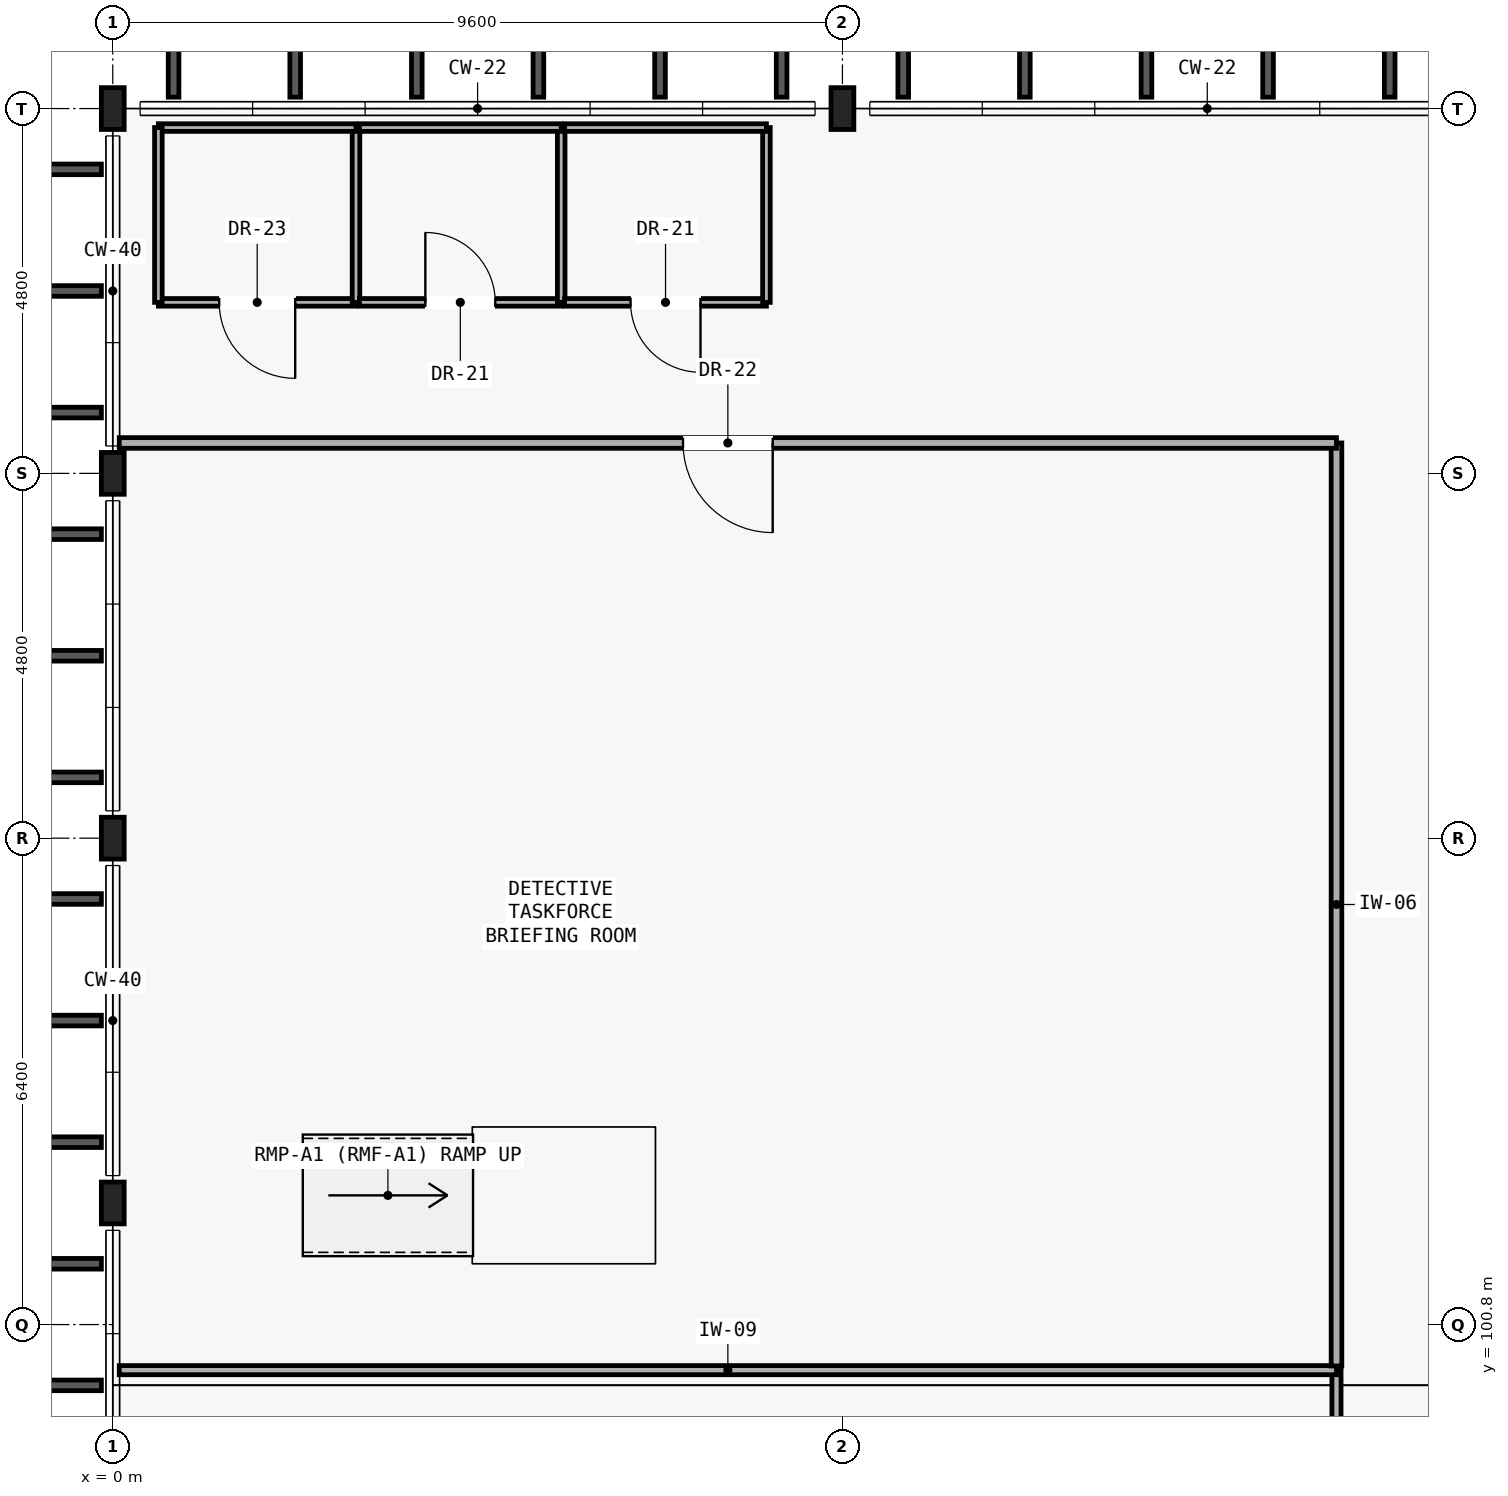
"""IFC4 building model, lengths in metres.
Left out: names, types, materials, properties, quantities, classifications, styles, units other than length and angle.
Written with IfcOpenShell. Run it as: python <this file> out.ifc"""

import sys

from ifc_helpers import new_model, si_unit, direction, frame, frame_2d, origin, origin_2d, place, context, subcontext, project, spatial, rectangle, i_section, extrude, element, fill, save


model = new_model("IFC4")
c1 = context("Model", 3, precision=1e-05, world=origin(), true_north=direction((0.0, 1.0)))
c2 = subcontext(c1, "Body", "Model", "MODEL_VIEW")
j1 = project(units=[si_unit("LENGTHUNIT", "METRE"), si_unit("PLANEANGLEUNIT", "RADIAN")], contexts=[c1])
p1 = place(None, origin())
s1 = spatial("IfcSite", under=j1, at=p1, CompositionType="ELEMENT")
p2 = place(p1, origin())
s2 = spatial("IfcBuilding", under=s1, at=p2, CompositionType="ELEMENT")
p3 = place(p2, frame((0.0, 0.0, 9.45)))
s3 = spatial("IfcBuildingStorey", under=s2, at=p3, CompositionType="ELEMENT", Elevation=9.45)
for number, where, z_axis, x_axis in (
    (1, (0.0, 102.4, 0.0), (0.0, 0.0, 1.0), (1.0, 0.0, 0.0)),
    (2, (0.0, 107.2, 0.0), (0.0, 0.0, 1.0), (1.0, 0.0, 0.0)),
    (3, (0.0, 112.0, 0.0), (0.0, 0.0, 1.0), (1.0, 0.0, 0.0)),
    (4, (0.0, 116.8, 0.0), (0.0, 0.0, 1.0), (1.0, 0.0, 0.0)),
    (5, (9.6, 116.8, 0.0), (0.0, 0.0, 1.0), (1.0, 0.0, 0.0)),
):
    element("IfcColumn", number, at=place(p3, frame(where, z_axis=z_axis, x_axis=x_axis)), inside=s3, PredefinedType="COLUMN", context=c2, shape_type="SweptSolid", body=[
        extrude(i_section(OverallWidth=0.3, OverallDepth=0.55, WebThickness=0.015, FlangeThickness=0.029, FilletRadius=0.027, at=origin_2d()), origin(), (0.0, 0.0, 1.0), 4.2),
    ])
p4 = place(p3, frame((16.1, 83.4, 0.0), z_axis=(0.0, 0.0, 1.0), x_axis=(0.0, 1.0, 0.0)))
e6 = element("IfcWall", 6, at=p4, inside=s3, PredefinedType="PARTITIONING", context=c2, shape_type="SweptSolid", body=[
    extrude(rectangle(XDim=16.8, YDim=0.12, at=frame_2d((8.4, 0.0))), origin(), (0.0, 0.0, 1.0), 3.97),
])
p5 = place(p4, frame((7.91, 0.0, 0.0)))
e7 = element("IfcOpeningElement", 7, at=p5, cuts=e6, PredefinedType="OPENING", context=c2, shape_type="SweptSolid", body=[
    extrude(rectangle(XDim=0.98, YDim=2.1, at=frame_2d((0.49, 1.05))), frame((0.0, 0.07, 0.0), z_axis=(0.0, -1.0, 0.0), x_axis=(1.0, 0.0, 0.0)), (0.0, 0.0, 1.0), 0.14),
])
p6 = place(p3, frame((16.1, 100.2, 0.0), z_axis=(0.0, 0.0, 1.0), x_axis=(-1.0, 0.0, 0.0)))
e8 = element("IfcWall", 8, at=p6, inside=s3, PredefinedType="PARTITIONING", context=c2, shape_type="SweptSolid", body=[
    extrude(rectangle(XDim=16.015, YDim=0.12, at=frame_2d((8.008, 0.0))), origin(), (0.0, 0.0, 1.0), 3.45),
])
p7 = place(p3, frame((16.1, 100.255, 0.0), z_axis=(0.0, 0.0, 1.0), x_axis=(0.0, 1.0, 0.0)))
e9 = element("IfcWall", 9, at=p7, inside=s3, PredefinedType="PARTITIONING", context=c2, shape_type="SweptSolid", body=[
    extrude(rectangle(XDim=12.145, YDim=0.14, at=frame_2d((6.073, 0.0))), origin(), (0.0, 0.0, 1.0), 3.97),
])
p8 = place(p3, frame((16.1, 112.4, 0.0), z_axis=(0.0, 0.0, 1.0), x_axis=(-1.0, 0.0, 0.0)))
e10 = element("IfcWall", 10, at=p8, inside=s3, PredefinedType="PARTITIONING", context=c2, shape_type="SweptSolid", body=[
    extrude(rectangle(XDim=16.015, YDim=0.14, at=frame_2d((8.008, 0.0))), origin(), (0.0, 0.0, 1.0), 3.97),
])
p9 = place(p8, frame((7.417, 0.0, 0.0)))
e11 = element("IfcOpeningElement", 11, at=p9, cuts=e10, PredefinedType="OPENING", context=c2, shape_type="SweptSolid", body=[
    extrude(rectangle(XDim=1.18, YDim=2.1, at=frame_2d((0.59, 1.05))), frame((0.0, 0.08, 0.0), z_axis=(0.0, -1.0, 0.0), x_axis=(1.0, 0.0, 0.0)), (0.0, 0.0, 1.0), 0.16),
])
p10 = place(p3, frame((0.6, 114.25, 0.0), z_axis=(0.0, 0.0, 1.0), x_axis=(1.0, 0.0, 0.0)))
e12 = element("IfcWall", 12, at=p10, inside=s3, PredefinedType="PARTITIONING", context=c2, shape_type="SweptSolid", body=[
    extrude(rectangle(XDim=2.6, YDim=0.1, at=frame_2d((1.3, 0.0))), origin(), (0.0, 0.0, 1.0), 3.45),
])
p11 = place(p10, frame((0.8, 0.0, 0.0)))
e13 = element("IfcOpeningElement", 13, at=p11, cuts=e12, PredefinedType="OPENING", context=c2, shape_type="SweptSolid", body=[
    extrude(rectangle(XDim=1.0, YDim=2.08, at=frame_2d((0.5, 1.04))), frame((0.0, 0.06, 0.0), z_axis=(0.0, -1.0, 0.0), x_axis=(1.0, 0.0, 0.0)), (0.0, 0.0, 1.0), 0.12),
])
p12 = place(p3, frame((3.2, 114.25, 0.0), z_axis=(0.0, 0.0, 1.0), x_axis=(0.0, 1.0, 0.0)))
e14 = element("IfcWall", 14, at=p12, inside=s3, PredefinedType="PARTITIONING", context=c2, shape_type="SweptSolid", body=[
    extrude(rectangle(XDim=2.3, YDim=0.1, at=frame_2d((1.15, 0.0))), origin(), (0.0, 0.0, 1.0), 3.97),
])
p13 = place(p3, frame((3.2, 116.55, 0.0), z_axis=(0.0, 0.0, 1.0), x_axis=(-1.0, 0.0, 0.0)))
e15 = element("IfcWall", 15, at=p13, inside=s3, PredefinedType="PARTITIONING", context=c2, shape_type="SweptSolid", body=[
    extrude(rectangle(XDim=2.6, YDim=0.1, at=frame_2d((1.3, 0.0))), origin(), (0.0, 0.0, 1.0), 3.15),
])
p14 = place(p3, frame((0.6, 116.55, 0.0), z_axis=(0.0, 0.0, 1.0), x_axis=(0.0, -1.0, 0.0)))
e16 = element("IfcWall", 16, at=p14, inside=s3, PredefinedType="PARTITIONING", context=c2, shape_type="SweptSolid", body=[
    extrude(rectangle(XDim=2.3, YDim=0.1, at=frame_2d((1.15, 0.0))), origin(), (0.0, 0.0, 1.0), 3.97),
])
p15 = place(p3, frame((3.245, 114.25, 0.0), z_axis=(0.0, 0.0, 1.0), x_axis=(1.0, 0.0, 0.0)))
e17 = element("IfcWall", 17, at=p15, inside=s3, PredefinedType="PARTITIONING", context=c2, shape_type="SweptSolid", body=[
    extrude(rectangle(XDim=2.655, YDim=0.1, at=frame_2d((1.327, 0.0))), origin(), (0.0, 0.0, 1.0), 3.45),
])
p16 = place(p15, frame((0.867, 0.0, 0.0)))
e18 = element("IfcOpeningElement", 18, at=p16, cuts=e17, PredefinedType="OPENING", context=c2, shape_type="SweptSolid", body=[
    extrude(rectangle(XDim=0.92, YDim=2.08, at=frame_2d((0.46, 1.04))), frame((0.0, 0.06, 0.0), z_axis=(0.0, -1.0, 0.0), x_axis=(1.0, 0.0, 0.0)), (0.0, 0.0, 1.0), 0.12),
])
p17 = place(p3, frame((5.9, 114.25, 0.0), z_axis=(0.0, 0.0, 1.0), x_axis=(0.0, 1.0, 0.0)))
e19 = element("IfcWall", 19, at=p17, inside=s3, PredefinedType="PARTITIONING", context=c2, shape_type="SweptSolid", body=[
    extrude(rectangle(XDim=2.3, YDim=0.1, at=frame_2d((1.15, 0.0))), origin(), (0.0, 0.0, 1.0), 3.97),
])
p18 = place(p3, frame((5.9, 116.55, 0.0), z_axis=(0.0, 0.0, 1.0), x_axis=(-1.0, 0.0, 0.0)))
e20 = element("IfcWall", 20, at=p18, inside=s3, PredefinedType="PARTITIONING", context=c2, shape_type="SweptSolid", body=[
    extrude(rectangle(XDim=2.655, YDim=0.1, at=frame_2d((1.327, 0.0))), origin(), (0.0, 0.0, 1.0), 3.15),
])
p19 = place(p3, frame((5.945, 114.25, 0.0), z_axis=(0.0, 0.0, 1.0), x_axis=(1.0, 0.0, 0.0)))
e21 = element("IfcWall", 21, at=p19, inside=s3, PredefinedType="PARTITIONING", context=c2, shape_type="SweptSolid", body=[
    extrude(rectangle(XDim=2.655, YDim=0.1, at=frame_2d((1.328, 0.0))), origin(), (0.0, 0.0, 1.0), 3.45),
])
p20 = place(p19, frame((0.867, 0.0, 0.0)))
e22 = element("IfcOpeningElement", 22, at=p20, cuts=e21, PredefinedType="OPENING", context=c2, shape_type="SweptSolid", body=[
    extrude(rectangle(XDim=0.92, YDim=2.08, at=frame_2d((0.46, 1.04))), frame((0.0, 0.06, 0.0), z_axis=(0.0, -1.0, 0.0), x_axis=(1.0, 0.0, 0.0)), (0.0, 0.0, 1.0), 0.12),
])
p21 = place(p3, frame((8.6, 114.25, 0.0), z_axis=(0.0, 0.0, 1.0), x_axis=(0.0, 1.0, 0.0)))
e23 = element("IfcWall", 23, at=p21, inside=s3, PredefinedType="PARTITIONING", context=c2, shape_type="SweptSolid", body=[
    extrude(rectangle(XDim=2.3, YDim=0.1, at=frame_2d((1.15, 0.0))), origin(), (0.0, 0.0, 1.0), 3.97),
])
p22 = place(p3, frame((8.6, 116.55, 0.0), z_axis=(0.0, 0.0, 1.0), x_axis=(-1.0, 0.0, 0.0)))
e24 = element("IfcWall", 24, at=p22, inside=s3, PredefinedType="PARTITIONING", context=c2, shape_type="SweptSolid", body=[
    extrude(rectangle(XDim=2.655, YDim=0.1, at=frame_2d((1.328, 0.0))), origin(), (0.0, 0.0, 1.0), 3.15),
])
p23 = place(p9, origin())
e25 = element("IfcDoor", 25, at=p23, inside=s3, OperationType="SINGLE_SWING_LEFT", PredefinedType="DOOR", context=c2, shape_type="SweptSolid", body=[
    extrude(rectangle(XDim=1.18, YDim=2.1, at=frame_2d((0.59, 1.05))), frame((0.0, 0.025, 0.0), z_axis=(0.0, -1.0, 0.0), x_axis=(1.0, 0.0, 0.0)), (0.0, 0.0, 1.0), 0.05),
])
fill(e11, e25)
p24 = place(p11, frame((1.0, 0.0, 0.0), z_axis=(0.0, 0.0, 1.0), x_axis=(-1.0, 0.0, 0.0)))
e26 = element("IfcDoor", 26, at=p24, inside=s3, OperationType="SINGLE_SWING_RIGHT", PredefinedType="DOOR", context=c2, shape_type="SweptSolid", body=[
    extrude(rectangle(XDim=1.0, YDim=2.08, at=frame_2d((0.5, 1.04))), frame((0.0, 0.025, 0.0), z_axis=(0.0, -1.0, 0.0), x_axis=(1.0, 0.0, 0.0)), (0.0, 0.0, 1.0), 0.05),
])
fill(e13, e26)
p25 = place(p16, origin())
e27 = element("IfcDoor", 27, at=p25, inside=s3, OperationType="SINGLE_SWING_LEFT", PredefinedType="DOOR", context=c2, shape_type="SweptSolid", body=[
    extrude(rectangle(XDim=0.92, YDim=2.08, at=frame_2d((0.46, 1.04))), frame((0.0, 0.025, 0.0), z_axis=(0.0, -1.0, 0.0), x_axis=(1.0, 0.0, 0.0)), (0.0, 0.0, 1.0), 0.05),
])
fill(e18, e27)
p26 = place(p20, frame((0.92, 0.0, 0.0), z_axis=(0.0, 0.0, 1.0), x_axis=(-1.0, 0.0, 0.0)))
e28 = element("IfcDoor", 28, at=p26, inside=s3, OperationType="SINGLE_SWING_RIGHT", PredefinedType="DOOR", context=c2, shape_type="SweptSolid", body=[
    extrude(rectangle(XDim=0.92, YDim=2.08, at=frame_2d((0.46, 1.04))), frame((0.0, 0.025, 0.0), z_axis=(0.0, -1.0, 0.0), x_axis=(1.0, 0.0, 0.0)), (0.0, 0.0, 1.0), 0.05),
])
fill(e22, e28)
save(model, sys.argv[1])
